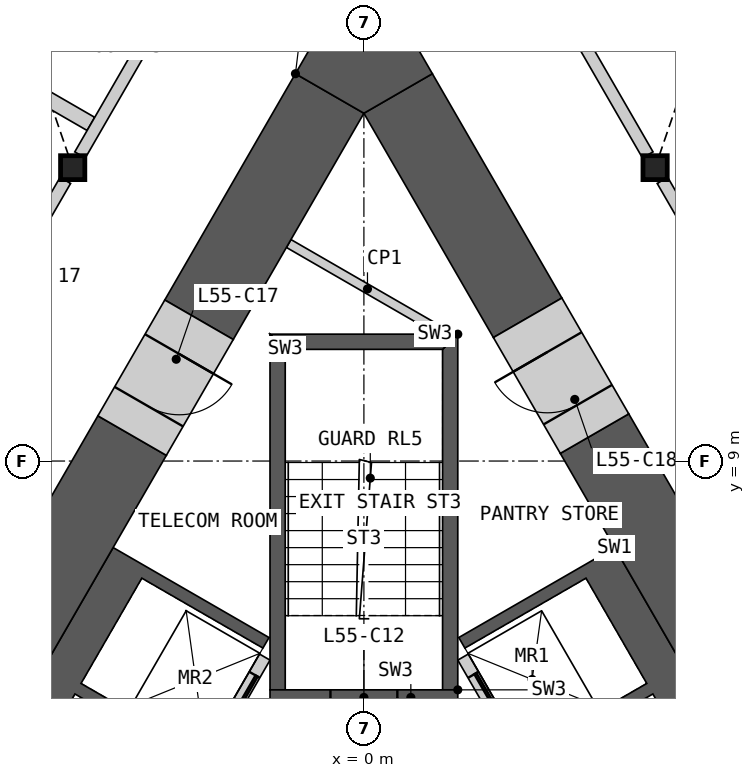
"""IFC4 building model, lengths in metres.
Left out: names, types, materials, properties, quantities, classifications, styles, units other than length and angle.
Written with IfcOpenShell. Run it as: python <this file> out.ifc"""

import sys

from ifc_helpers import new_model, si_unit, direction, frame, frame_2d, origin, origin_2d, place, context, subcontext, project, spatial, polyline, rectangle, i_section, outline, extrude, element, fill, save


model = new_model("IFC4")
c1 = context("Model", 3, precision=1e-05, world=origin(), true_north=direction((0.0, 1.0)))
c2 = subcontext(c1, "Body", "Model", "MODEL_VIEW")
j1 = project(units=[si_unit("LENGTHUNIT", "METRE"), si_unit("PLANEANGLEUNIT", "RADIAN")], contexts=[c1])
p1 = place(None, origin())
s1 = spatial("IfcSite", under=j1, at=p1, CompositionType="ELEMENT")
p2 = place(p1, origin())
s2 = spatial("IfcBuilding", under=s1, at=p2, CompositionType="ELEMENT")
p3 = place(p2, frame((0.0, 0.0, 249.0)))
s3 = spatial("IfcBuildingStorey", under=s2, at=p3, CompositionType="ELEMENT", Elevation=249.0)
for number, where, z_axis, x_axis in (
    (1, (-4.789, 13.825, 0.0), (0.0, 0.0, 1.0), (1.0, 0.0, 0.0)),
    (2, (4.789, 13.825, 0.0), (0.0, 0.0, 1.0), (1.0, 0.0, 0.0)),
):
    element("IfcColumn", number, at=place(p3, frame(where, z_axis=z_axis, x_axis=x_axis)), inside=s3, PredefinedType="COLUMN", context=c2, shape_type="SweptSolid", body=[
        extrude(i_section(OverallWidth=0.399, OverallDepth=0.393, WebThickness=0.023, FlangeThickness=0.037, at=origin_2d()), origin(), (0.0, 0.0, 1.0), 3.6),
    ])
p4 = place(p3, origin())
e3 = element("IfcWall", 3, at=p4, inside=s3, PredefinedType="SHEAR", context=c2, shape_type="SweptSolid", body=[
    extrude(outline(polyline([(4.124, 7.577), (8.624, -0.217), (8.231, -0.444), (6.061, -1.697), (5.96, -1.524), (7.952, -0.374), (4.752, 5.169), (2.76, 4.019), (2.66, 4.192), (4.652, 5.342), (3.652, 7.074), (1.66, 5.924), (1.561, 6.097), (3.731, 7.35), (4.124, 7.577)])), origin(), (0.0, 0.0, 1.0), 3.25),
])
p5 = place(p3, frame((5.817, -1.476, 0.0), z_axis=(0.0, 0.0, 1.0), x_axis=(-0.500002616675, 0.866023893041, 0.0)))
e4 = element("IfcWall", 4, at=p5, inside=s3, PredefinedType="SOLIDWALL", context=c2, shape_type="SweptSolid", body=[
    extrude(rectangle(XDim=8.373, YDim=0.2, at=frame_2d((4.187, 0.0))), origin(), (0.0, 0.0, 1.0), 3.25),
])
p6 = place(p5, frame((2.637, 0.0, 0.0)))
e5 = element("IfcOpeningElement", 5, at=p6, cuts=e4, PredefinedType="OPENING", context=c2, shape_type="SweptSolid", body=[
    extrude(rectangle(XDim=0.9, YDim=2.1, at=frame_2d((0.45, 1.05))), frame((0.0, 0.11, 0.0), z_axis=(0.0, -1.0, 0.0), x_axis=(1.0, 0.0, 0.0)), (0.0, 0.0, 1.0), 0.22),
])
p7 = place(p5, frame((6.937, 0.0, 0.0)))
e6 = element("IfcOpeningElement", 6, at=p7, cuts=e4, PredefinedType="OPENING", context=c2, shape_type="SweptSolid", body=[
    extrude(rectangle(XDim=1.1, YDim=2.1, at=frame_2d((0.55, 1.05))), frame((0.0, 0.11, 0.0), z_axis=(0.0, -1.0, 0.0), x_axis=(1.0, 0.0, 0.0)), (0.0, 0.0, 1.0), 0.22),
])
p8 = place(p3, origin())
e7 = element("IfcWall", 7, at=p8, inside=s3, PredefinedType="SHEAR", context=c2, shape_type="SweptSolid", body=[
    extrude(outline(polyline([(-7.524, 1.688), (-4.124, 7.577), (-3.731, 7.35), (-1.561, 6.097), (-1.66, 5.924), (-3.652, 7.074), (-4.652, 5.342), (-2.66, 4.192), (-2.76, 4.019), (-4.752, 5.169), (-5.752, 3.437), (-3.76, 2.287), (-3.861, 2.113), (-5.852, 3.263), (-6.852, 1.531), (-4.861, 0.381), (-4.96, 0.208), (-7.131, 1.461), (-7.524, 1.688)])), origin(), (0.0, 0.0, 1.0), 3.25),
])
p9 = place(p3, frame((-1.631, 5.776, 0.0), z_axis=(0.0, 0.0, 1.0), x_axis=(-0.499992876559, -0.866029516466, 0.0)))
e8 = element("IfcWall", 8, at=p9, inside=s3, PredefinedType="SOLIDWALL", context=c2, shape_type="SweptSolid", body=[
    extrude(rectangle(XDim=6.486, YDim=0.2, at=frame_2d((3.243, 0.0))), origin(), (0.0, 0.0, 1.0), 3.25),
])
p10 = place(p9, frame((0.337, 0.0, 0.0)))
e9 = element("IfcOpeningElement", 9, at=p10, cuts=e8, PredefinedType="OPENING", context=c2, shape_type="SweptSolid", body=[
    extrude(rectangle(XDim=1.1, YDim=2.1, at=frame_2d((0.55, 1.05))), frame((0.0, 0.11, 0.0), z_axis=(0.0, -1.0, 0.0), x_axis=(1.0, 0.0, 0.0)), (0.0, 0.0, 1.0), 0.22),
])
p11 = place(p9, frame((2.537, 0.0, 0.0)))
e10 = element("IfcOpeningElement", 10, at=p11, cuts=e8, PredefinedType="OPENING", context=c2, shape_type="SweptSolid", body=[
    extrude(rectangle(XDim=1.1, YDim=2.1, at=frame_2d((0.55, 1.05))), frame((0.0, 0.11, 0.0), z_axis=(0.0, -1.0, 0.0), x_axis=(1.0, 0.0, 0.0)), (0.0, 0.0, 1.0), 0.22),
])
p12 = place(p3, origin())
e11 = element("IfcWall", 11, at=p12, inside=s3, PredefinedType="SHEAR", context=c2, shape_type="SweptSolid", body=[
    extrude(outline(polyline([(1.544, 5.237), (1.544, 11.087), (1.294, 10.837), (1.294, 5.237), (1.544, 5.237)])), origin(), (0.0, 0.0, 1.0), 3.25),
])
p13 = place(p3, origin())
e12 = element("IfcWall", 12, at=p13, inside=s3, PredefinedType="SHEAR", context=c2, shape_type="SweptSolid", body=[
    extrude(outline(polyline([(1.544, 11.087), (-1.544, 11.087), (-1.294, 10.837), (1.294, 10.837), (1.544, 11.087)])), origin(), (0.0, 0.0, 1.0), 3.25),
])
p14 = place(p3, origin())
e13 = element("IfcWall", 13, at=p14, inside=s3, PredefinedType="SHEAR", context=c2, shape_type="SweptSolid", body=[
    extrude(outline(polyline([(-1.294, 10.837), (-1.544, 11.087), (-1.544, 5.237), (-1.294, 5.237), (-1.294, 10.837)])), origin(), (0.0, 0.0, 1.0), 3.25),
])
p15 = place(p3, frame((1.544, 5.112, 0.0), z_axis=(0.0, 0.0, 1.0), x_axis=(-1.0, 0.0, 0.0)))
e14 = element("IfcWall", 14, at=p15, inside=s3, PredefinedType="SHEAR", context=c2, shape_type="SweptSolid", body=[
    extrude(rectangle(XDim=3.088, YDim=0.25, at=frame_2d((1.544, 0.0))), origin(), (0.0, 0.0, 1.0), 3.25),
])
p16 = place(p15, frame((0.994, 0.0, 0.0)))
e15 = element("IfcOpeningElement", 15, at=p16, cuts=e14, PredefinedType="OPENING", context=c2, shape_type="SweptSolid", body=[
    extrude(rectangle(XDim=1.1, YDim=2.1, at=frame_2d((0.55, 1.05))), frame((0.0, 0.135, 0.0), z_axis=(0.0, -1.0, 0.0), x_axis=(1.0, 0.0, 0.0)), (0.0, 0.0, 1.0), 0.27),
])
p17 = place(p3, frame((-1.237, 12.578, 0.0), z_axis=(0.0, 0.0, 1.0), x_axis=(0.866045649925, -0.499964931016, 0.0)))
e16 = element("IfcWall", 16, at=p17, inside=s3, PredefinedType="PARTITIONING", context=c2, shape_type="SweptSolid", body=[
    extrude(rectangle(XDim=2.992, YDim=0.15, at=frame_2d((1.496, 0.0))), origin(), (0.0, 0.0, 1.0), 3.25),
])
p18 = place(p3, frame((10.062, -1.408, 0.0), z_axis=(0.0, 0.0, 1.0), x_axis=(-0.500000545805, 0.866025088663, 0.0)))
e17 = element("IfcWall", 17, at=p18, inside=s3, PredefinedType="SHEAR", context=c2, shape_type="SweptSolid", body=[
    extrude(rectangle(XDim=12.539, YDim=1.3, at=frame_2d((6.27, 0.0))), origin(), (0.0, 0.0, 1.0), 3.25),
])
p19 = place(p3, frame((2.693, 11.356, 0.0), z_axis=(0.0, 0.0, 1.0), x_axis=(-0.50002837164, 0.866009022791, 0.0)))
e18 = element("IfcWall", 18, at=p19, inside=s3, PredefinedType="SHEAR", context=c2, shape_type="SweptSolid", body=[
    extrude(rectangle(XDim=4.26, YDim=1.3, at=frame_2d((2.13, 0.0))), origin(), (0.0, 0.0, 1.0), 3.25),
])
p20 = place(p3, frame((-3.812, 9.418, 0.0), z_axis=(0.0, 0.0, 1.0), x_axis=(-0.499995037753, -0.86602826872, 0.0)))
e19 = element("IfcWall", 19, at=p20, inside=s3, PredefinedType="SHEAR", context=c2, shape_type="SweptSolid", body=[
    extrude(rectangle(XDim=8.451, YDim=1.3, at=frame_2d((4.225, 0.0))), origin(), (0.0, 0.0, 1.0), 3.25),
])
p21 = place(p3, frame((-0.563, 15.045, 0.0), z_axis=(0.0, 0.0, 1.0), x_axis=(-0.499994567278, -0.866028540345, 0.0)))
e20 = element("IfcWall", 20, at=p21, inside=s3, PredefinedType="SHEAR", context=c2, shape_type="SweptSolid", body=[
    extrude(rectangle(XDim=4.297, YDim=1.3, at=frame_2d((2.149, 0.0))), origin(), (0.0, 0.0, 1.0), 3.25),
])
p22 = place(p3, origin())
e21 = element("IfcWall", 21, at=p22, inside=s3, PredefinedType="SHEAR", context=c2, shape_type="SweptSolid", body=[
    extrude(outline(polyline([(-1.126, 15.371), (0.0, 17.321), (1.126, 15.371), (0.0, 14.72), (-1.126, 15.371)])), origin(), (0.0, 0.0, 1.0), 3.25),
])
p23 = place(p3, frame((-2.712, 11.324, 0.0), z_axis=(0.0, 0.0, 1.0), x_axis=(-0.499946605688, -0.86605622881, 0.0)))
e22 = element("IfcWall", 22, at=p23, inside=s3, PredefinedType="SHEAR", context=c2, shape_type="SweptSolid", body=[
    extrude(rectangle(XDim=2.2, YDim=1.3, at=frame_2d((1.1, 0.0))), origin(), (0.0, 0.0, 1.0), 3.25),
])
p24 = place(p23, frame((0.65, 0.0, 0.0)))
e23 = element("IfcOpeningElement", 23, at=p24, cuts=e22, PredefinedType="OPENING", context=c2, shape_type="SweptSolid", body=[
    extrude(rectangle(XDim=1.0, YDim=2.1, at=frame_2d((0.5, 1.05))), frame((0.0, 0.66, 0.0), z_axis=(0.0, -1.0, 0.0), x_axis=(1.0, 0.0, 0.0)), (0.0, 0.0, 1.0), 1.32),
])
p25 = place(p3, frame((3.793, 9.451, 0.0), z_axis=(0.0, 0.0, 1.0), x_axis=(-0.499946605688, 0.86605622881, 0.0)))
e24 = element("IfcWall", 24, at=p25, inside=s3, PredefinedType="SHEAR", context=c2, shape_type="SweptSolid", body=[
    extrude(rectangle(XDim=2.2, YDim=1.3, at=frame_2d((1.1, 0.0))), origin(), (0.0, 0.0, 1.0), 3.25),
])
p26 = place(p25, frame((0.55, 0.0, 0.0)))
e25 = element("IfcOpeningElement", 25, at=p26, cuts=e24, PredefinedType="OPENING", context=c2, shape_type="SweptSolid", body=[
    extrude(rectangle(XDim=1.0, YDim=2.1, at=frame_2d((0.5, 1.05))), frame((0.0, 0.66, 0.0), z_axis=(0.0, -1.0, 0.0), x_axis=(1.0, 0.0, 0.0)), (0.0, 0.0, 1.0), 1.32),
])
p27 = place(p3, frame((-15.138, 20.693, 0.0), z_axis=(0.0, 0.0, 1.0), x_axis=(0.866015637476, -0.500016915361, 0.0)))
e26 = element("IfcWall", 26, at=p27, inside=s3, PredefinedType="PARTITIONING", context=c2, shape_type="SweptSolid", body=[
    extrude(rectangle(XDim=12.296, YDim=0.25, at=frame_2d((6.148, 0.0))), origin(), (0.0, 0.0, 1.0), 2.404),
])
p28 = place(p3, frame((4.91, 13.616, 0.0), z_axis=(0.0, 0.0, 1.0), x_axis=(0.50000207303, -0.866024206917, 0.0)))
e27 = element("IfcWall", 27, at=p28, inside=s3, PredefinedType="PARTITIONING", context=c2, shape_type="SweptSolid", body=[
    extrude(rectangle(XDim=9.095, YDim=0.2, at=frame_2d((4.547, 0.0))), origin(), (0.0, 0.0, 1.0), 3.25),
])
p29 = place(p28, frame((5.726, 0.0, 0.0)))
e28 = element("IfcOpeningElement", 28, at=p29, cuts=e27, PredefinedType="OPENING", context=c2, shape_type="SweptSolid", body=[
    extrude(rectangle(XDim=1.8, YDim=2.1, at=frame_2d((0.9, 1.05))), frame((0.0, 0.11, 0.0), z_axis=(0.0, -1.0, 0.0), x_axis=(1.0, 0.0, 0.0)), (0.0, 0.0, 1.0), 0.22),
])
p30 = place(p3, frame((-9.458, 5.74, 0.0), z_axis=(0.0, 0.0, 1.0), x_axis=(0.50000207303, 0.866024206917, 0.0)))
e29 = element("IfcWall", 29, at=p30, inside=s3, PredefinedType="PARTITIONING", context=c2, shape_type="SweptSolid", body=[
    extrude(rectangle(XDim=9.095, YDim=0.2, at=frame_2d((4.547, 0.0))), origin(), (0.0, 0.0, 1.0), 3.25),
])
p31 = place(p30, frame((1.162, 0.0, 0.0)))
e30 = element("IfcOpeningElement", 30, at=p31, cuts=e29, PredefinedType="OPENING", context=c2, shape_type="SweptSolid", body=[
    extrude(rectangle(XDim=1.1, YDim=2.1, at=frame_2d((0.55, 1.05))), frame((0.0, 0.11, 0.0), z_axis=(0.0, -1.0, 0.0), x_axis=(1.0, 0.0, 0.0)), (0.0, 0.0, 1.0), 0.22),
])
p32 = place(p3, frame((-4.668, 14.035, 0.0), z_axis=(0.0, 0.0, 1.0), x_axis=(0.499984524817, 0.866034338201, 0.0)))
e31 = element("IfcWall", 31, at=p32, inside=s3, PredefinedType="PARTITIONING", context=c2, shape_type="SweptSolid", body=[
    extrude(rectangle(XDim=5.51, YDim=0.2, at=frame_2d((2.755, 0.0))), origin(), (0.0, 0.0, 1.0), 3.25),
])
p33 = place(p32, frame((4.01, 0.0, 0.0)))
e32 = element("IfcOpeningElement", 32, at=p33, cuts=e31, PredefinedType="OPENING", context=c2, shape_type="SweptSolid", body=[
    extrude(rectangle(XDim=1.1, YDim=2.1, at=frame_2d((0.55, 1.05))), frame((0.0, 0.11, 0.0), z_axis=(0.0, -1.0, 0.0), x_axis=(1.0, 0.0, 0.0)), (0.0, 0.0, 1.0), 0.22),
])
p34 = place(p3, frame((1.913, 18.807, 0.0), z_axis=(0.0, 0.0, 1.0), x_axis=(0.499984524817, -0.866034338201, 0.0)))
e33 = element("IfcWall", 33, at=p34, inside=s3, PredefinedType="PARTITIONING", context=c2, shape_type="SweptSolid", body=[
    extrude(rectangle(XDim=5.51, YDim=0.2, at=frame_2d((2.755, 0.0))), origin(), (0.0, 0.0, 1.0), 3.25),
])
p35 = place(p34, frame((0.35, 0.0, 0.0)))
e34 = element("IfcOpeningElement", 34, at=p35, cuts=e33, PredefinedType="OPENING", context=c2, shape_type="SweptSolid", body=[
    extrude(rectangle(XDim=1.1, YDim=2.1, at=frame_2d((0.55, 1.05))), frame((0.0, 0.11, 0.0), z_axis=(0.0, -1.0, 0.0), x_axis=(1.0, 0.0, 0.0)), (0.0, 0.0, 1.0), 0.22),
])
p36 = place(p7, origin())
e35 = element("IfcDoor", 35, at=p36, inside=s3, OperationType="SLIDING_TO_LEFT", PredefinedType="DOOR", context=c2, shape_type="SweptSolid", body=[
    extrude(rectangle(XDim=1.1, YDim=2.1, at=frame_2d((0.55, 1.05))), frame((0.0, 0.025, 0.0), z_axis=(0.0, -1.0, 0.0), x_axis=(1.0, 0.0, 0.0)), (0.0, 0.0, 1.0), 0.05),
])
fill(e6, e35)
p37 = place(p10, origin())
e36 = element("IfcDoor", 36, at=p37, inside=s3, OperationType="SLIDING_TO_LEFT", PredefinedType="DOOR", context=c2, shape_type="SweptSolid", body=[
    extrude(rectangle(XDim=1.1, YDim=2.1, at=frame_2d((0.55, 1.05))), frame((0.0, 0.025, 0.0), z_axis=(0.0, -1.0, 0.0), x_axis=(1.0, 0.0, 0.0)), (0.0, 0.0, 1.0), 0.05),
])
fill(e9, e36)
p38 = place(p16, origin())
e37 = element("IfcDoor", 37, at=p38, inside=s3, OperationType="SINGLE_SWING_LEFT", PredefinedType="DOOR", context=c2, shape_type="SweptSolid", body=[
    extrude(rectangle(XDim=1.1, YDim=2.1, at=frame_2d((0.55, 1.05))), frame((0.0, 0.025, 0.0), z_axis=(0.0, -1.0, 0.0), x_axis=(1.0, 0.0, 0.0)), (0.0, 0.0, 1.0), 0.05),
])
fill(e15, e37)
p39 = place(p24, origin())
e38 = element("IfcDoor", 38, at=p39, inside=s3, OperationType="SINGLE_SWING_LEFT", PredefinedType="DOOR", context=c2, shape_type="SweptSolid", body=[
    extrude(rectangle(XDim=1.0, YDim=2.1, at=frame_2d((0.5, 1.05))), frame((0.0, 0.405, 0.0), z_axis=(0.0, -1.0, 0.0), x_axis=(1.0, 0.0, 0.0)), (0.0, 0.0, 1.0), 0.05),
])
fill(e23, e38)
p40 = place(p26, origin())
e39 = element("IfcDoor", 39, at=p40, inside=s3, OperationType="SINGLE_SWING_RIGHT", PredefinedType="DOOR", context=c2, shape_type="SweptSolid", body=[
    extrude(rectangle(XDim=1.0, YDim=2.1, at=frame_2d((0.5, 1.05))), frame((0.0, 0.405, 0.0), z_axis=(0.0, -1.0, 0.0), x_axis=(1.0, 0.0, 0.0)), (0.0, 0.0, 1.0), 0.05),
])
fill(e25, e39)
save(model, sys.argv[1])
